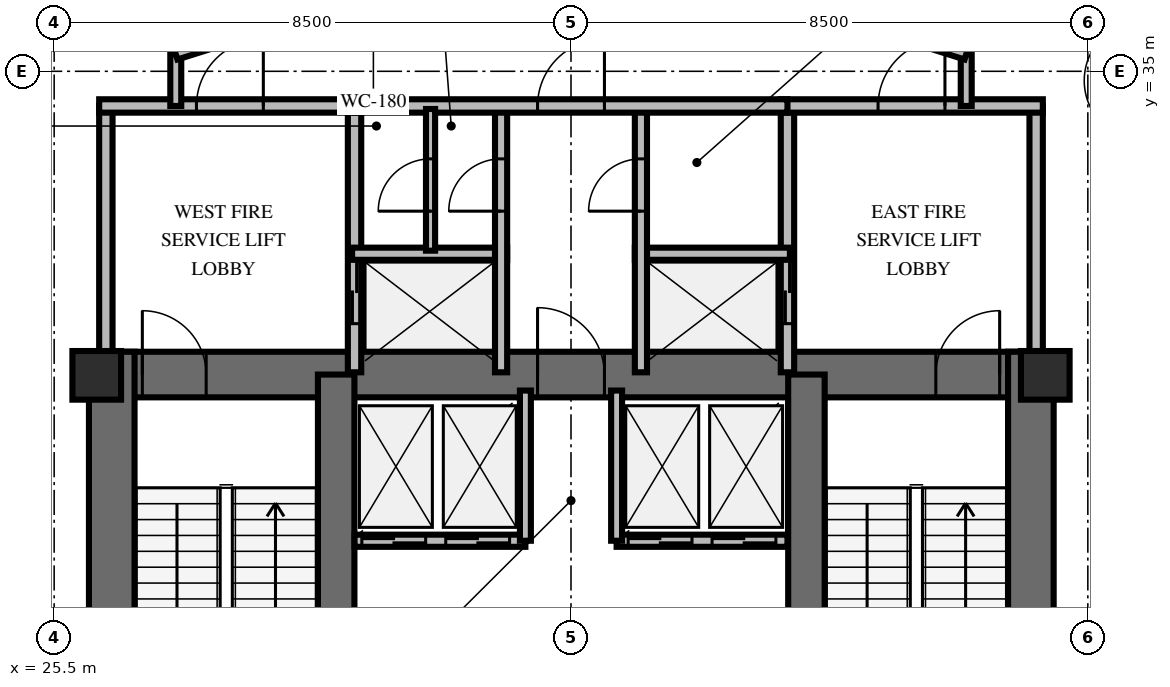
"""IFC4 building model, lengths in metres.
Left out: names, types, materials, properties, quantities, classifications, styles, units other than length and angle.
Written with IfcOpenShell. Run it as: python <this file> out.ifc"""

import sys

from ifc_helpers import new_model, si_unit, direction, frame, frame_2d, origin, origin_2d, place, context, subcontext, project, spatial, rectangle, extrude, element, fill, save


model = new_model("IFC4")
c1 = context("Model", 3, precision=1e-05, world=origin(), true_north=direction((0.0, 1.0)))
c2 = subcontext(c1, "Body", "Model", "MODEL_VIEW")
j1 = project(units=[si_unit("LENGTHUNIT", "METRE"), si_unit("PLANEANGLEUNIT", "RADIAN")], contexts=[c1])
p1 = place(None, origin())
s1 = spatial("IfcSite", under=j1, at=p1, CompositionType="ELEMENT")
p2 = place(p1, origin())
s2 = spatial("IfcBuilding", under=s1, at=p2, CompositionType="ELEMENT")
p3 = place(p2, frame((0.0, 0.0, 195.2)))
s3 = spatial("IfcBuildingStorey", under=s2, at=p3, CompositionType="ELEMENT", Elevation=195.2)
p4 = place(p3, frame((26.072, 30.013, 0.0), z_axis=(0.0, 0.0, 1.0), x_axis=(1.0, 0.0, 0.0)))
e1 = element("IfcWall", 1, at=p4, inside=s3, PredefinedType="SHEAR", context=c2, shape_type="SweptSolid", body=[
    extrude(rectangle(XDim=15.866, YDim=0.75, at=frame_2d((7.933, 0.0))), origin(), (0.0, 0.0, 1.0), 3.6),
])
p5 = place(p4, frame((0.878, 0.0, 0.0)))
e2 = element("IfcOpeningElement", 2, at=p5, cuts=e1, PredefinedType="OPENING", context=c2, shape_type="SweptSolid", body=[
    extrude(rectangle(XDim=1.05, YDim=2.15, at=frame_2d((0.525, 1.075))), frame((0.0, 0.385, 0.0), z_axis=(0.0, -1.0, 0.0), x_axis=(1.0, 0.0, 0.0)), (0.0, 0.0, 1.0), 0.77),
])
p6 = place(p4, frame((13.928, 0.0, 0.0)))
e3 = element("IfcOpeningElement", 3, at=p6, cuts=e1, PredefinedType="OPENING", context=c2, shape_type="SweptSolid", body=[
    extrude(rectangle(XDim=1.05, YDim=2.15, at=frame_2d((0.525, 1.075))), frame((0.0, 0.385, 0.0), z_axis=(0.0, -1.0, 0.0), x_axis=(1.0, 0.0, 0.0)), (0.0, 0.0, 1.0), 0.77),
])
p7 = place(p4, frame((7.378, 0.0, 0.0)))
e4 = element("IfcOpeningElement", 4, at=p7, cuts=e1, PredefinedType="OPENING", context=c2, shape_type="SweptSolid", body=[
    extrude(rectangle(XDim=1.1, YDim=2.15, at=frame_2d((0.55, 1.075))), frame((0.0, 0.385, 0.0), z_axis=(0.0, -1.0, 0.0), x_axis=(1.0, 0.0, 0.0)), (0.0, 0.0, 1.0), 0.77),
])
for number, where, z_axis, x_axis in (
    (5, (26.447, 19.812, 0.0), (0.0, 0.0, 1.0), (0.0, 1.0, 0.0)),
    (6, (41.563, 19.812, 0.0), (0.0, 0.0, 1.0), (0.0, 1.0, 0.0)),
):
    element("IfcWall", number, at=place(p3, frame(where, z_axis=z_axis, x_axis=x_axis)), inside=s3, PredefinedType="SHEAR", context=c2, shape_type="SweptSolid", body=[
        extrude(rectangle(XDim=10.576, YDim=0.75, at=frame_2d((5.288, 0.0))), origin(), (0.0, 0.0, 1.0), 3.6),
    ])
for number, where, z_axis, x_axis in (
    (7, (30.138, 20.187, 0.0), (0.0, 0.0, 1.0), (0.0, 1.0, 0.0)),
    (8, (37.872, 20.187, 0.0), (0.0, 0.0, 1.0), (0.0, 1.0, 0.0)),
):
    element("IfcWall", number, at=place(p3, frame(where, z_axis=z_axis, x_axis=x_axis)), inside=s3, PredefinedType="SHEAR", context=c2, shape_type="SweptSolid", body=[
        extrude(rectangle(XDim=9.826, YDim=0.6, at=frame_2d((4.913, 0.0))), origin(), (0.0, 0.0, 1.0), 3.6),
    ])
for number, where, z_axis, x_axis in (
    (9, (26.2, 30.0, 0.0), (0.0, 0.0, 1.0), (1.0, 0.0, 0.0)),
    (10, (41.8, 30.0, 0.0), (0.0, 0.0, 1.0), (1.0, 0.0, 0.0)),
):
    element("IfcColumn", number, at=place(p3, frame(where, z_axis=z_axis, x_axis=x_axis)), inside=s3, PredefinedType="PILASTER", context=c2, shape_type="SweptSolid", body=[
        extrude(rectangle(XDim=0.8, YDim=0.8, at=origin_2d()), origin(), (0.0, 0.0, 1.0), 3.6),
    ])
p8 = place(p3, frame((26.35, 30.05, 0.0), z_axis=(0.0, 0.0, 1.0), x_axis=(0.0, 1.0, 0.0)))
e11 = element("IfcWall", 11, at=p8, inside=s3, PredefinedType="SOLIDWALL", context=c2, shape_type="SweptSolid", body=[
    extrude(rectangle(XDim=4.38, YDim=0.22, at=frame_2d((2.19, 0.0))), origin(), (0.0, 0.0, 1.0), 2.46),
])
p9 = place(p3, frame((30.44, 30.05, 0.0), z_axis=(0.0, 0.0, 1.0), x_axis=(0.0, 1.0, 0.0)))
e12 = element("IfcWall", 12, at=p9, inside=s3, PredefinedType="SOLIDWALL", context=c2, shape_type="SweptSolid", body=[
    extrude(rectangle(XDim=4.38, YDim=0.22, at=frame_2d((2.19, 0.0))), origin(), (0.0, 0.0, 1.0), 2.46),
])
p10 = place(p9, frame((0.8, 0.0, 0.0)))
e13 = element("IfcOpeningElement", 13, at=p10, cuts=e12, PredefinedType="OPENING", context=c2, shape_type="SweptSolid", body=[
    extrude(rectangle(XDim=1.05, YDim=2.1, at=frame_2d((0.525, 1.05))), frame((0.0, 0.12, 0.0), z_axis=(0.0, -1.0, 0.0), x_axis=(1.0, 0.0, 0.0)), (0.0, 0.0, 1.0), 0.24),
])
p11 = place(p3, frame((26.24, 34.43, 0.0), z_axis=(0.0, 0.0, 1.0), x_axis=(1.0, 0.0, 0.0)))
e14 = element("IfcWall", 14, at=p11, inside=s3, PredefinedType="SOLIDWALL", context=c2, shape_type="SweptSolid", body=[
    extrude(rectangle(XDim=4.31, YDim=0.22, at=frame_2d((2.155, 0.0))), origin(), (0.0, 0.0, 1.0), 2.46),
])
p12 = place(p11, frame((1.6, 0.0, 0.0)))
e15 = element("IfcOpeningElement", 15, at=p12, cuts=e14, PredefinedType="OPENING", context=c2, shape_type="SweptSolid", body=[
    extrude(rectangle(XDim=1.1, YDim=2.15, at=frame_2d((0.55, 1.075))), frame((0.0, 0.12, 0.0), z_axis=(0.0, -1.0, 0.0), x_axis=(1.0, 0.0, 0.0)), (0.0, 0.0, 1.0), 0.24),
])
p13 = place(p3, frame((30.4, 32.0, 0.0), z_axis=(0.0, 0.0, 1.0), x_axis=(1.0, 0.0, 0.0)))
e16 = element("IfcWall", 16, at=p13, inside=s3, PredefinedType="SOLIDWALL", context=c2, shape_type="SweptSolid", body=[
    extrude(rectangle(XDim=2.55, YDim=0.2, at=frame_2d((1.275, 0.0))), origin(), (0.0, 0.0, 1.0), 2.46),
])
p14 = place(p3, frame((32.85, 30.05, 0.0), z_axis=(0.0, 0.0, 1.0), x_axis=(0.0, 1.0, 0.0)))
e17 = element("IfcWall", 17, at=p14, inside=s3, PredefinedType="SOLIDWALL", context=c2, shape_type="SweptSolid", body=[
    extrude(rectangle(XDim=4.38, YDim=0.2, at=frame_2d((2.19, 0.0))), origin(), (0.0, 0.0, 1.0), 2.46),
])
p15 = place(p14, frame((2.65, 0.0, 0.0)))
e18 = element("IfcOpeningElement", 18, at=p15, cuts=e17, PredefinedType="OPENING", context=c2, shape_type="SweptSolid", body=[
    extrude(rectangle(XDim=0.86, YDim=2.05, at=frame_2d((0.43, 1.025))), frame((0.0, 0.11, 0.0), z_axis=(0.0, -1.0, 0.0), x_axis=(1.0, 0.0, 0.0)), (0.0, 0.0, 1.0), 0.22),
])
p16 = place(p3, frame((37.56, 30.05, 0.0), z_axis=(0.0, 0.0, 1.0), x_axis=(0.0, 1.0, 0.0)))
e19 = element("IfcWall", 19, at=p16, inside=s3, PredefinedType="SOLIDWALL", context=c2, shape_type="SweptSolid", body=[
    extrude(rectangle(XDim=4.38, YDim=0.22, at=frame_2d((2.19, 0.0))), origin(), (0.0, 0.0, 1.0), 2.46),
])
p17 = place(p16, frame((0.8, 0.0, 0.0)))
e20 = element("IfcOpeningElement", 20, at=p17, cuts=e19, PredefinedType="OPENING", context=c2, shape_type="SweptSolid", body=[
    extrude(rectangle(XDim=1.05, YDim=2.1, at=frame_2d((0.525, 1.05))), frame((0.0, 0.12, 0.0), z_axis=(0.0, -1.0, 0.0), x_axis=(1.0, 0.0, 0.0)), (0.0, 0.0, 1.0), 0.24),
])
p18 = place(p3, frame((41.65, 30.05, 0.0), z_axis=(0.0, 0.0, 1.0), x_axis=(0.0, 1.0, 0.0)))
e21 = element("IfcWall", 21, at=p18, inside=s3, PredefinedType="SOLIDWALL", context=c2, shape_type="SweptSolid", body=[
    extrude(rectangle(XDim=4.38, YDim=0.22, at=frame_2d((2.19, 0.0))), origin(), (0.0, 0.0, 1.0), 2.46),
])
p19 = place(p3, frame((37.45, 34.43, 0.0), z_axis=(0.0, 0.0, 1.0), x_axis=(1.0, 0.0, 0.0)))
e22 = element("IfcWall", 22, at=p19, inside=s3, PredefinedType="SOLIDWALL", context=c2, shape_type="SweptSolid", body=[
    extrude(rectangle(XDim=4.31, YDim=0.22, at=frame_2d((2.155, 0.0))), origin(), (0.0, 0.0, 1.0), 2.46),
])
p20 = place(p19, frame((1.6, 0.0, 0.0)))
e23 = element("IfcOpeningElement", 23, at=p20, cuts=e22, PredefinedType="OPENING", context=c2, shape_type="SweptSolid", body=[
    extrude(rectangle(XDim=1.1, YDim=2.15, at=frame_2d((0.55, 1.075))), frame((0.0, 0.12, 0.0), z_axis=(0.0, -1.0, 0.0), x_axis=(1.0, 0.0, 0.0)), (0.0, 0.0, 1.0), 0.24),
])
p21 = place(p3, frame((35.05, 32.0, 0.0), z_axis=(0.0, 0.0, 1.0), x_axis=(1.0, 0.0, 0.0)))
e24 = element("IfcWall", 24, at=p21, inside=s3, PredefinedType="SOLIDWALL", context=c2, shape_type="SweptSolid", body=[
    extrude(rectangle(XDim=2.55, YDim=0.2, at=frame_2d((1.275, 0.0))), origin(), (0.0, 0.0, 1.0), 2.46),
])
p22 = place(p3, frame((35.15, 30.05, 0.0), z_axis=(0.0, 0.0, 1.0), x_axis=(0.0, 1.0, 0.0)))
e25 = element("IfcWall", 25, at=p22, inside=s3, PredefinedType="SOLIDWALL", context=c2, shape_type="SweptSolid", body=[
    extrude(rectangle(XDim=4.38, YDim=0.2, at=frame_2d((2.19, 0.0))), origin(), (0.0, 0.0, 1.0), 2.46),
])
p23 = place(p22, frame((2.65, 0.0, 0.0)))
e26 = element("IfcOpeningElement", 26, at=p23, cuts=e25, PredefinedType="OPENING", context=c2, shape_type="SweptSolid", body=[
    extrude(rectangle(XDim=0.86, YDim=2.05, at=frame_2d((0.43, 1.025))), frame((0.0, 0.11, 0.0), z_axis=(0.0, -1.0, 0.0), x_axis=(1.0, 0.0, 0.0)), (0.0, 0.0, 1.0), 0.22),
])
p24 = place(p3, frame((30.44, 34.43, 0.0), z_axis=(0.0, 0.0, 1.0), x_axis=(1.0, 0.0, 0.0)))
e27 = element("IfcWall", 27, at=p24, inside=s3, PredefinedType="SOLIDWALL", context=c2, shape_type="SweptSolid", body=[
    extrude(rectangle(XDim=7.12, YDim=0.22, at=frame_2d((3.56, 0.0))), origin(), (0.0, 0.0, 1.0), 2.46),
])
p25 = place(p24, frame((3.01, 0.0, 0.0)))
e28 = element("IfcOpeningElement", 28, at=p25, cuts=e27, PredefinedType="OPENING", context=c2, shape_type="SweptSolid", body=[
    extrude(rectangle(XDim=1.1, YDim=2.15, at=frame_2d((0.55, 1.075))), frame((0.0, 0.12, 0.0), z_axis=(0.0, -1.0, 0.0), x_axis=(1.0, 0.0, 0.0)), (0.0, 0.0, 1.0), 0.24),
])
p26 = place(p3, frame((31.69, 32.05, 0.0), z_axis=(0.0, 0.0, 1.0), x_axis=(0.0, 1.0, 0.0)))
e29 = element("IfcWall", 29, at=p26, inside=s3, PredefinedType="PARTITIONING", context=c2, shape_type="SweptSolid", body=[
    extrude(rectangle(XDim=2.33, YDim=0.15, at=frame_2d((1.165, 0.0))), origin(), (0.0, 0.0, 1.0), 2.46),
])
p27 = place(p26, frame((0.65, 0.0, 0.0)))
e30 = element("IfcOpeningElement", 30, at=p27, cuts=e29, PredefinedType="OPENING", context=c2, shape_type="SweptSolid", body=[
    extrude(rectangle(XDim=0.86, YDim=2.05, at=frame_2d((0.43, 1.025))), frame((0.0, 0.085, 0.0), z_axis=(0.0, -1.0, 0.0), x_axis=(1.0, 0.0, 0.0)), (0.0, 0.0, 1.0), 0.17),
])
p28 = place(p3, frame((30.44, 27.28, 0.0), z_axis=(0.0, 0.0, 1.0), x_axis=(1.0, 0.0, 0.0)))
e31 = element("IfcWall", 31, at=p28, inside=s3, PredefinedType="SOLIDWALL", context=c2, shape_type="SweptSolid", body=[
    extrude(rectangle(XDim=2.81, YDim=0.2, at=frame_2d((1.405, 0.0))), origin(), (0.0, 0.0, 1.0), 2.46),
])
p29 = place(p28, frame((0.12, 0.0, 0.0)))
e32 = element("IfcOpeningElement", 32, at=p29, cuts=e31, PredefinedType="OPENING", context=c2, shape_type="SweptSolid", body=[
    extrude(rectangle(XDim=1.05, YDim=2.1, at=frame_2d((0.525, 1.05))), frame((0.0, 0.11, 0.0), z_axis=(0.0, -1.0, 0.0), x_axis=(1.0, 0.0, 0.0)), (0.0, 0.0, 1.0), 0.22),
])
p30 = place(p28, frame((1.5, 0.0, 0.0)))
e33 = element("IfcOpeningElement", 33, at=p30, cuts=e31, PredefinedType="OPENING", context=c2, shape_type="SweptSolid", body=[
    extrude(rectangle(XDim=1.05, YDim=2.1, at=frame_2d((0.525, 1.05))), frame((0.0, 0.11, 0.0), z_axis=(0.0, -1.0, 0.0), x_axis=(1.0, 0.0, 0.0)), (0.0, 0.0, 1.0), 0.22),
])
p31 = place(p3, frame((33.25, 27.28, 0.0), z_axis=(0.0, 0.0, 1.0), x_axis=(0.0, 1.0, 0.0)))
e34 = element("IfcWall", 34, at=p31, inside=s3, PredefinedType="SOLIDWALL", context=c2, shape_type="SweptSolid", body=[
    extrude(rectangle(XDim=2.47, YDim=0.18, at=frame_2d((1.235, 0.0))), origin(), (0.0, 0.0, 1.0), 2.46),
])
p32 = place(p3, frame((34.75, 27.28, 0.0), z_axis=(0.0, 0.0, 1.0), x_axis=(1.0, 0.0, 0.0)))
e35 = element("IfcWall", 35, at=p32, inside=s3, PredefinedType="SOLIDWALL", context=c2, shape_type="SweptSolid", body=[
    extrude(rectangle(XDim=2.81, YDim=0.2, at=frame_2d((1.405, 0.0))), origin(), (0.0, 0.0, 1.0), 2.46),
])
p33 = place(p32, frame((0.19, 0.0, 0.0)))
e36 = element("IfcOpeningElement", 36, at=p33, cuts=e35, PredefinedType="OPENING", context=c2, shape_type="SweptSolid", body=[
    extrude(rectangle(XDim=1.05, YDim=2.1, at=frame_2d((0.525, 1.05))), frame((0.0, 0.11, 0.0), z_axis=(0.0, -1.0, 0.0), x_axis=(1.0, 0.0, 0.0)), (0.0, 0.0, 1.0), 0.22),
])
p34 = place(p32, frame((1.57, 0.0, 0.0)))
e37 = element("IfcOpeningElement", 37, at=p34, cuts=e35, PredefinedType="OPENING", context=c2, shape_type="SweptSolid", body=[
    extrude(rectangle(XDim=1.05, YDim=2.1, at=frame_2d((0.525, 1.05))), frame((0.0, 0.11, 0.0), z_axis=(0.0, -1.0, 0.0), x_axis=(1.0, 0.0, 0.0)), (0.0, 0.0, 1.0), 0.22),
])
p35 = place(p3, frame((34.75, 27.28, 0.0), z_axis=(0.0, 0.0, 1.0), x_axis=(0.0, 1.0, 0.0)))
e38 = element("IfcWall", 38, at=p35, inside=s3, PredefinedType="SOLIDWALL", context=c2, shape_type="SweptSolid", body=[
    extrude(rectangle(XDim=2.47, YDim=0.18, at=frame_2d((1.235, 0.0))), origin(), (0.0, 0.0, 1.0), 2.46),
])
for number, where, z_axis, x_axis in (
    (39, (27.5, 34.43, 0.0), (0.0, 0.0, 1.0), (0.0, 1.0, 0.0)),
    (40, (40.5, 35.28, 0.0), (0.0, 0.0, 1.0), (0.0, -1.0, 0.0)),
):
    element("IfcWall", number, at=place(p3, frame(where, z_axis=z_axis, x_axis=x_axis)), inside=s3, PredefinedType="PARTITIONING", context=c2, shape_type="SweptSolid", body=[
        extrude(rectangle(XDim=0.85, YDim=0.18, at=frame_2d((0.425, 0.0))), origin(), (0.0, 0.0, 1.0), 2.46),
    ])
p36 = place(p3, frame((27.5, 35.28, 0.0), z_axis=(0.0, 0.0, 1.0), x_axis=(0.953691418528, 0.300786765376, 0.0)))
e41 = element("IfcWall", 41, at=p36, inside=s3, PredefinedType="PARTITIONING", context=c2, shape_type="SweptSolid", body=[
    extrude(rectangle(XDim=6.816, YDim=0.18, at=frame_2d((3.408, 0.0))), origin(), (0.0, 0.0, 1.0), 2.46),
])
p37 = place(p36, frame((2.858, 0.0, 0.0)))
e42 = element("IfcOpeningElement", 42, at=p37, cuts=e41, PredefinedType="OPENING", context=c2, shape_type="SweptSolid", body=[
    extrude(rectangle(XDim=1.1, YDim=2.15, at=frame_2d((0.55, 1.075))), frame((0.0, 0.1, 0.0), z_axis=(0.0, -1.0, 0.0), x_axis=(1.0, 0.0, 0.0)), (0.0, 0.0, 1.0), 0.2),
])
p38 = place(p3, frame((34.0, 37.33, 0.0), z_axis=(0.0, 0.0, 1.0), x_axis=(0.953691418528, -0.300786765376, 0.0)))
e43 = element("IfcWall", 43, at=p38, inside=s3, PredefinedType="PARTITIONING", context=c2, shape_type="SweptSolid", body=[
    extrude(rectangle(XDim=6.816, YDim=0.18, at=frame_2d((3.408, 0.0))), origin(), (0.0, 0.0, 1.0), 2.46),
])
p39 = place(p38, frame((2.858, 0.0, 0.0)))
e44 = element("IfcOpeningElement", 44, at=p39, cuts=e43, PredefinedType="OPENING", context=c2, shape_type="SweptSolid", body=[
    extrude(rectangle(XDim=1.1, YDim=2.15, at=frame_2d((0.55, 1.075))), frame((0.0, 0.1, 0.0), z_axis=(0.0, -1.0, 0.0), x_axis=(1.0, 0.0, 0.0)), (0.0, 0.0, 1.0), 0.2),
])
p40 = place(p3, frame((44.165, 34.216, 0.0), z_axis=(0.0, 0.0, 1.0), x_axis=(-0.754153769573, 0.656697869525, 0.0)))
e45 = element("IfcWall", 45, at=p40, inside=s3, PredefinedType="PARTITIONING", context=c2, shape_type="SweptSolid", body=[
    extrude(rectangle(XDim=4.539, YDim=0.18, at=frame_2d((2.27, 0.0))), origin(), (0.0, 0.0, 1.0), 2.46),
])
p41 = place(p40, frame((0.96, 0.0, 0.0)))
e46 = element("IfcOpeningElement", 46, at=p41, cuts=e45, PredefinedType="OPENING", context=c2, shape_type="SweptSolid", body=[
    extrude(rectangle(XDim=1.0, YDim=2.15, at=frame_2d((0.5, 1.075))), frame((0.0, 0.1, 0.0), z_axis=(0.0, -1.0, 0.0), x_axis=(1.0, 0.0, 0.0)), (0.0, 0.0, 1.0), 0.2),
])
p42 = place(p3, frame((27.674, 37.437, 0.0), z_axis=(0.0, 0.0, 1.0), x_axis=(-0.777710585506, -0.62862249816, 0.0)))
e47 = element("IfcWall", 47, at=p42, inside=s3, PredefinedType="PARTITIONING", context=c2, shape_type="SweptSolid", body=[
    extrude(rectangle(XDim=4.539, YDim=0.18, at=frame_2d((2.27, 0.0))), origin(), (0.0, 0.0, 1.0), 2.46),
])
p43 = place(p5, origin())
e48 = element("IfcDoor", 48, at=p43, inside=s3, OperationType="SINGLE_SWING_LEFT", PredefinedType="DOOR", context=c2, shape_type="SweptSolid", body=[
    extrude(rectangle(XDim=1.05, YDim=2.15, at=frame_2d((0.525, 1.075))), frame((0.0, 0.025, 0.0), z_axis=(0.0, -1.0, 0.0), x_axis=(1.0, 0.0, 0.0)), (0.0, 0.0, 1.0), 0.05),
])
fill(e2, e48)
p44 = place(p6, origin())
e49 = element("IfcDoor", 49, at=p44, inside=s3, OperationType="SINGLE_SWING_RIGHT", PredefinedType="DOOR", context=c2, shape_type="SweptSolid", body=[
    extrude(rectangle(XDim=1.05, YDim=2.15, at=frame_2d((0.525, 1.075))), frame((0.0, 0.025, 0.0), z_axis=(0.0, -1.0, 0.0), x_axis=(1.0, 0.0, 0.0)), (0.0, 0.0, 1.0), 0.05),
])
fill(e3, e49)
p45 = place(p7, origin())
e50 = element("IfcDoor", 50, at=p45, inside=s3, OperationType="SINGLE_SWING_LEFT", PredefinedType="DOOR", context=c2, shape_type="SweptSolid", body=[
    extrude(rectangle(XDim=1.1, YDim=2.15, at=frame_2d((0.55, 1.075))), frame((0.0, 0.025, 0.0), z_axis=(0.0, -1.0, 0.0), x_axis=(1.0, 0.0, 0.0)), (0.0, 0.0, 1.0), 0.05),
])
fill(e4, e50)
p46 = place(p12, origin())
e51 = element("IfcDoor", 51, at=p46, inside=s3, OperationType="SINGLE_SWING_RIGHT", PredefinedType="DOOR", context=c2, shape_type="SweptSolid", body=[
    extrude(rectangle(XDim=1.1, YDim=2.15, at=frame_2d((0.55, 1.075))), frame((0.0, 0.025, 0.0), z_axis=(0.0, -1.0, 0.0), x_axis=(1.0, 0.0, 0.0)), (0.0, 0.0, 1.0), 0.05),
])
fill(e15, e51)
p47 = place(p10, origin())
e52 = element("IfcDoor", 52, at=p47, inside=s3, OperationType="DOUBLE_DOOR_SLIDING", PredefinedType="USERDEFINED", context=c2, shape_type="SweptSolid", body=[
    extrude(rectangle(XDim=1.05, YDim=2.1, at=frame_2d((0.525, 1.05))), frame((0.0, 0.025, 0.0), z_axis=(0.0, -1.0, 0.0), x_axis=(1.0, 0.0, 0.0)), (0.0, 0.0, 1.0), 0.05),
])
fill(e13, e52)
p48 = place(p15, origin())
e53 = element("IfcDoor", 53, at=p48, inside=s3, OperationType="SINGLE_SWING_LEFT", PredefinedType="TRAPDOOR", context=c2, shape_type="SweptSolid", body=[
    extrude(rectangle(XDim=0.86, YDim=2.05, at=frame_2d((0.43, 1.025))), frame((0.0, 0.025, 0.0), z_axis=(0.0, -1.0, 0.0), x_axis=(1.0, 0.0, 0.0)), (0.0, 0.0, 1.0), 0.05),
])
fill(e18, e53)
p49 = place(p20, origin())
e54 = element("IfcDoor", 54, at=p49, inside=s3, OperationType="SINGLE_SWING_RIGHT", PredefinedType="DOOR", context=c2, shape_type="SweptSolid", body=[
    extrude(rectangle(XDim=1.1, YDim=2.15, at=frame_2d((0.55, 1.075))), frame((0.0, 0.025, 0.0), z_axis=(0.0, -1.0, 0.0), x_axis=(1.0, 0.0, 0.0)), (0.0, 0.0, 1.0), 0.05),
])
fill(e23, e54)
p50 = place(p17, origin())
e55 = element("IfcDoor", 55, at=p50, inside=s3, OperationType="DOUBLE_DOOR_SLIDING", PredefinedType="USERDEFINED", context=c2, shape_type="SweptSolid", body=[
    extrude(rectangle(XDim=1.05, YDim=2.1, at=frame_2d((0.525, 1.05))), frame((0.0, 0.025, 0.0), z_axis=(0.0, -1.0, 0.0), x_axis=(1.0, 0.0, 0.0)), (0.0, 0.0, 1.0), 0.05),
])
fill(e20, e55)
p51 = place(p23, origin())
e56 = element("IfcDoor", 56, at=p51, inside=s3, OperationType="SINGLE_SWING_LEFT", PredefinedType="TRAPDOOR", context=c2, shape_type="SweptSolid", body=[
    extrude(rectangle(XDim=0.86, YDim=2.05, at=frame_2d((0.43, 1.025))), frame((0.0, 0.025, 0.0), z_axis=(0.0, -1.0, 0.0), x_axis=(1.0, 0.0, 0.0)), (0.0, 0.0, 1.0), 0.05),
])
fill(e26, e56)
p52 = place(p25, origin())
e57 = element("IfcDoor", 57, at=p52, inside=s3, OperationType="SINGLE_SWING_RIGHT", PredefinedType="DOOR", context=c2, shape_type="SweptSolid", body=[
    extrude(rectangle(XDim=1.1, YDim=2.15, at=frame_2d((0.55, 1.075))), frame((0.0, 0.025, 0.0), z_axis=(0.0, -1.0, 0.0), x_axis=(1.0, 0.0, 0.0)), (0.0, 0.0, 1.0), 0.05),
])
fill(e28, e57)
p53 = place(p27, origin())
e58 = element("IfcDoor", 58, at=p53, inside=s3, OperationType="SINGLE_SWING_LEFT", PredefinedType="TRAPDOOR", context=c2, shape_type="SweptSolid", body=[
    extrude(rectangle(XDim=0.86, YDim=2.05, at=frame_2d((0.43, 1.025))), frame((0.0, 0.025, 0.0), z_axis=(0.0, -1.0, 0.0), x_axis=(1.0, 0.0, 0.0)), (0.0, 0.0, 1.0), 0.05),
])
fill(e30, e58)
p54 = place(p29, origin())
e59 = element("IfcDoor", 59, at=p54, inside=s3, OperationType="DOUBLE_DOOR_SLIDING", PredefinedType="USERDEFINED", context=c2, shape_type="SweptSolid", body=[
    extrude(rectangle(XDim=1.05, YDim=2.1, at=frame_2d((0.525, 1.05))), frame((0.0, 0.025, 0.0), z_axis=(0.0, -1.0, 0.0), x_axis=(1.0, 0.0, 0.0)), (0.0, 0.0, 1.0), 0.05),
])
fill(e32, e59)
p55 = place(p30, origin())
e60 = element("IfcDoor", 60, at=p55, inside=s3, OperationType="DOUBLE_DOOR_SLIDING", PredefinedType="USERDEFINED", context=c2, shape_type="SweptSolid", body=[
    extrude(rectangle(XDim=1.05, YDim=2.1, at=frame_2d((0.525, 1.05))), frame((0.0, 0.025, 0.0), z_axis=(0.0, -1.0, 0.0), x_axis=(1.0, 0.0, 0.0)), (0.0, 0.0, 1.0), 0.05),
])
fill(e33, e60)
p56 = place(p33, origin())
e61 = element("IfcDoor", 61, at=p56, inside=s3, OperationType="DOUBLE_DOOR_SLIDING", PredefinedType="USERDEFINED", context=c2, shape_type="SweptSolid", body=[
    extrude(rectangle(XDim=1.05, YDim=2.1, at=frame_2d((0.525, 1.05))), frame((0.0, 0.025, 0.0), z_axis=(0.0, -1.0, 0.0), x_axis=(1.0, 0.0, 0.0)), (0.0, 0.0, 1.0), 0.05),
])
fill(e36, e61)
p57 = place(p34, origin())
e62 = element("IfcDoor", 62, at=p57, inside=s3, OperationType="DOUBLE_DOOR_SLIDING", PredefinedType="USERDEFINED", context=c2, shape_type="SweptSolid", body=[
    extrude(rectangle(XDim=1.05, YDim=2.1, at=frame_2d((0.525, 1.05))), frame((0.0, 0.025, 0.0), z_axis=(0.0, -1.0, 0.0), x_axis=(1.0, 0.0, 0.0)), (0.0, 0.0, 1.0), 0.05),
])
fill(e37, e62)
save(model, sys.argv[1])
